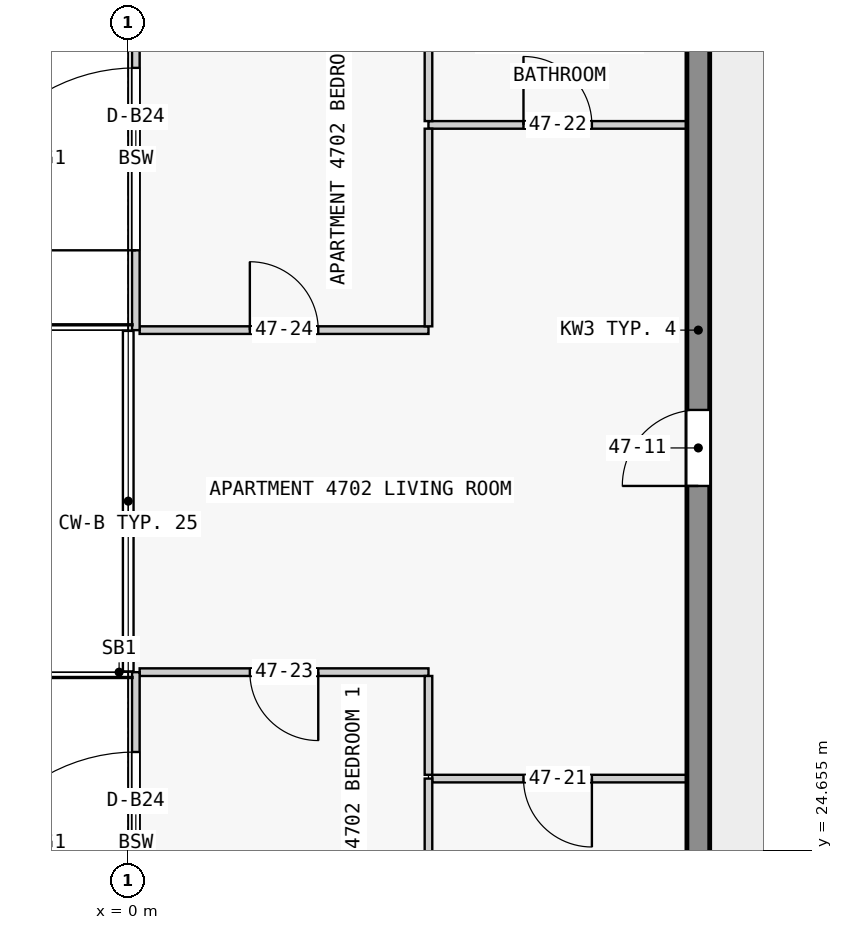
"""IFC4 building model, lengths in metres.
Left out: names, types, materials, properties, quantities, classifications, styles, units other than length and angle.
Written with IfcOpenShell. Run it as: python <this file> out.ifc"""

import sys

from ifc_helpers import new_model, si_unit, direction, frame, frame_2d, origin, place, context, subcontext, project, spatial, rectangle, extrude, element, fill, save


model = new_model("IFC4")
c1 = context("Model", 3, precision=1e-05, world=origin(), true_north=direction((0.0, 1.0)))
c2 = subcontext(c1, "Body", "Model", "MODEL_VIEW")
j1 = project(units=[si_unit("LENGTHUNIT", "METRE"), si_unit("PLANEANGLEUNIT", "RADIAN")], contexts=[c1])
p1 = place(None, origin())
s1 = spatial("IfcSite", under=j1, at=p1, CompositionType="ELEMENT")
p2 = place(p1, origin())
s2 = spatial("IfcBuilding", under=s1, at=p2, CompositionType="ELEMENT")
p3 = place(p2, frame((0.0, 0.0, 181.4)))
s3 = spatial("IfcBuildingStorey", under=s2, at=p3, CompositionType="ELEMENT", Elevation=181.4)
p4 = place(p3, frame((7.5, 18.0, 0.0), z_axis=(0.0, 0.0, 1.0), x_axis=(0.0, 1.0, 0.0)))
e1 = element("IfcWall", 1, at=p4, inside=s3, PredefinedType="SHEAR", context=c2, shape_type="SweptSolid", body=[
    extrude(rectangle(XDim=27.0, YDim=0.3, at=frame_2d((13.5, 0.0))), origin(), (0.0, 0.0, 1.0), 3.2),
])
p5 = place(p4, frame((1.75, 0.0, 0.0)))
e2 = element("IfcOpeningElement", 2, at=p5, cuts=e1, PredefinedType="OPENING", context=c2, shape_type="SweptSolid", body=[
    extrude(rectangle(XDim=1.0, YDim=2.1, at=frame_2d((0.5, 1.05))), frame((0.0, 0.16, 0.0), z_axis=(0.0, -1.0, 0.0), x_axis=(1.0, 0.0, 0.0)), (0.0, 0.0, 1.0), 0.32),
])
p6 = place(p4, frame((11.45, 0.0, 0.0)))
e3 = element("IfcOpeningElement", 3, at=p6, cuts=e1, PredefinedType="OPENING", context=c2, shape_type="SweptSolid", body=[
    extrude(rectangle(XDim=1.0, YDim=2.1, at=frame_2d((0.5, 1.05))), frame((0.0, 0.16, 0.0), z_axis=(0.0, -1.0, 0.0), x_axis=(1.0, 0.0, 0.0)), (0.0, 0.0, 1.0), 0.32),
])
p7 = place(p4, frame((19.75, 0.0, 0.0)))
e4 = element("IfcOpeningElement", 4, at=p7, cuts=e1, PredefinedType="OPENING", context=c2, shape_type="SweptSolid", body=[
    extrude(rectangle(XDim=1.0, YDim=2.1, at=frame_2d((0.5, 1.05))), frame((0.0, 0.16, 0.0), z_axis=(0.0, -1.0, 0.0), x_axis=(1.0, 0.0, 0.0)), (0.0, 0.0, 1.0), 0.32),
])
p8 = place(p4, frame((23.25, 0.0, 0.0)))
e5 = element("IfcOpeningElement", 5, at=p8, cuts=e1, PredefinedType="OPENING", context=c2, shape_type="SweptSolid", body=[
    extrude(rectangle(XDim=0.9, YDim=2.1, at=frame_2d((0.45, 1.05))), frame((0.0, 0.16, 0.0), z_axis=(0.0, -1.0, 0.0), x_axis=(1.0, 0.0, 0.0)), (0.0, 0.0, 1.0), 0.32),
])
p9 = place(p4, frame((25.45, 0.0, 0.0)))
e6 = element("IfcOpeningElement", 6, at=p9, cuts=e1, PredefinedType="OPENING", context=c2, shape_type="SweptSolid", body=[
    extrude(rectangle(XDim=1.0, YDim=2.1, at=frame_2d((0.5, 1.05))), frame((0.0, 0.16, 0.0), z_axis=(0.0, -1.0, 0.0), x_axis=(1.0, 0.0, 0.0)), (0.0, 0.0, 1.0), 0.32),
])
p10 = place(p3, frame((0.1, 22.5, 0.0), z_axis=(0.0, 0.0, 1.0), x_axis=(0.0, 1.0, 0.0)))
e7 = element("IfcWall", 7, at=p10, inside=s3, PredefinedType="STANDARD", context=c2, shape_type="SweptSolid", body=[
    extrude(rectangle(XDim=4.5, YDim=0.1, at=frame_2d((2.25, 0.0))), origin(), (0.0, 0.0, 1.0), 3.2),
])
p11 = place(p10, frame((1.05, 0.0, 0.0)))
e8 = element("IfcOpeningElement", 8, at=p11, cuts=e7, PredefinedType="OPENING", context=c2, shape_type="SweptSolid", body=[
    extrude(rectangle(XDim=2.4, YDim=2.4, at=frame_2d((1.2, 1.2))), frame((0.0, 0.06, 0.0), z_axis=(0.0, -1.0, 0.0), x_axis=(1.0, 0.0, 0.0)), (0.0, 0.0, 1.0), 0.12),
])
p12 = place(p3, frame((0.1, 31.5, 0.0), z_axis=(0.0, 0.0, 1.0), x_axis=(0.0, 1.0, 0.0)))
e9 = element("IfcWall", 9, at=p12, inside=s3, PredefinedType="STANDARD", context=c2, shape_type="SweptSolid", body=[
    extrude(rectangle(XDim=4.5, YDim=0.1, at=frame_2d((2.25, 0.0))), origin(), (0.0, 0.0, 1.0), 3.2),
])
p13 = place(p12, frame((1.05, 0.0, 0.0)))
e10 = element("IfcOpeningElement", 10, at=p13, cuts=e9, PredefinedType="OPENING", context=c2, shape_type="SweptSolid", body=[
    extrude(rectangle(XDim=2.4, YDim=2.4, at=frame_2d((1.2, 1.2))), frame((0.0, 0.06, 0.0), z_axis=(0.0, -1.0, 0.0), x_axis=(1.0, 0.0, 0.0)), (0.0, 0.0, 1.0), 0.12),
])
p14 = place(p3, frame((7.35, 25.6, 0.0), z_axis=(0.0, 0.0, 1.0), x_axis=(-1.0, 0.0, 0.0)))
e11 = element("IfcWall", 11, at=p14, inside=s3, PredefinedType="PARTITIONING", context=c2, shape_type="SweptSolid", body=[
    extrude(rectangle(XDim=3.35, YDim=0.1, at=frame_2d((1.675, 0.0))), origin(), (0.0, 0.0, 1.0), 3.2),
])
p15 = place(p14, frame((1.25, 0.0, 0.0)))
e12 = element("IfcOpeningElement", 12, at=p15, cuts=e11, PredefinedType="OPENING", context=c2, shape_type="SweptSolid", body=[
    extrude(rectangle(XDim=0.9, YDim=2.1, at=frame_2d((0.45, 1.05))), frame((0.0, 0.06, 0.0), z_axis=(0.0, -1.0, 0.0), x_axis=(1.0, 0.0, 0.0)), (0.0, 0.0, 1.0), 0.12),
])
p16 = place(p3, frame((3.95, 27.0, 0.0), z_axis=(0.0, 0.0, 1.0), x_axis=(-1.0, 0.0, 0.0)))
e13 = element("IfcWall", 13, at=p16, inside=s3, PredefinedType="PARTITIONING", context=c2, shape_type="SweptSolid", body=[
    extrude(rectangle(XDim=3.8, YDim=0.1, at=frame_2d((1.9, 0.0))), origin(), (0.0, 0.0, 1.0), 3.2),
])
p17 = place(p16, frame((1.45, 0.0, 0.0)))
e14 = element("IfcOpeningElement", 14, at=p17, cuts=e13, PredefinedType="OPENING", context=c2, shape_type="SweptSolid", body=[
    extrude(rectangle(XDim=0.9, YDim=2.1, at=frame_2d((0.45, 1.05))), frame((0.0, 0.06, 0.0), z_axis=(0.0, -1.0, 0.0), x_axis=(1.0, 0.0, 0.0)), (0.0, 0.0, 1.0), 0.12),
])
p18 = place(p3, frame((0.15, 31.5, 0.0), z_axis=(0.0, 0.0, 1.0), x_axis=(1.0, 0.0, 0.0)))
e15 = element("IfcWall", 15, at=p18, inside=s3, PredefinedType="PARTITIONING", context=c2, shape_type="SweptSolid", body=[
    extrude(rectangle(XDim=3.8, YDim=0.1, at=frame_2d((1.9, 0.0))), origin(), (0.0, 0.0, 1.0), 3.2),
])
p19 = place(p18, frame((1.45, 0.0, 0.0)))
e16 = element("IfcOpeningElement", 16, at=p19, cuts=e15, PredefinedType="OPENING", context=c2, shape_type="SweptSolid", body=[
    extrude(rectangle(XDim=0.9, YDim=2.1, at=frame_2d((0.45, 1.05))), frame((0.0, 0.06, 0.0), z_axis=(0.0, -1.0, 0.0), x_axis=(1.0, 0.0, 0.0)), (0.0, 0.0, 1.0), 0.12),
])
p20 = place(p3, frame((3.95, 34.2, 0.0), z_axis=(0.0, 0.0, 1.0), x_axis=(1.0, 0.0, 0.0)))
e17 = element("IfcWall", 17, at=p20, inside=s3, PredefinedType="PARTITIONING", context=c2, shape_type="SweptSolid", body=[
    extrude(rectangle(XDim=3.4, YDim=0.1, at=frame_2d((1.7, 0.0))), origin(), (0.0, 0.0, 1.0), 3.2),
])
p21 = place(p20, frame((1.25, 0.0, 0.0)))
e18 = element("IfcOpeningElement", 18, at=p21, cuts=e17, PredefinedType="OPENING", context=c2, shape_type="SweptSolid", body=[
    extrude(rectangle(XDim=0.9, YDim=2.1, at=frame_2d((0.45, 1.05))), frame((0.0, 0.06, 0.0), z_axis=(0.0, -1.0, 0.0), x_axis=(1.0, 0.0, 0.0)), (0.0, 0.0, 1.0), 0.12),
])
p22 = place(p3, frame((3.95, 25.6, 0.0), z_axis=(0.0, 0.0, 1.0), x_axis=(0.0, -1.0, 0.0)))
e19 = element("IfcWall", 19, at=p22, inside=s3, PredefinedType="PARTITIONING", context=c2, shape_type="SweptSolid", body=[
    extrude(rectangle(XDim=3.0, YDim=0.1, at=frame_2d((1.5, 0.0))), origin(), (0.0, 0.0, 1.0), 3.2),
])
p23 = place(p3, frame((3.95, 35.9, 0.0), z_axis=(0.0, 0.0, 1.0), x_axis=(0.0, -1.0, 0.0)))
e20 = element("IfcWall", 20, at=p23, inside=s3, PredefinedType="PARTITIONING", context=c2, shape_type="SweptSolid", body=[
    extrude(rectangle(XDim=1.65, YDim=0.1, at=frame_2d((0.825, 0.0))), origin(), (0.0, 0.0, 1.0), 3.2),
])
p24 = place(p3, frame((3.95, 25.65, 0.0), z_axis=(0.0, 0.0, 1.0), x_axis=(0.0, 1.0, 0.0)))
e21 = element("IfcWall", 21, at=p24, inside=s3, PredefinedType="PARTITIONING", context=c2, shape_type="SweptSolid", body=[
    extrude(rectangle(XDim=1.3, YDim=0.1, at=frame_2d((0.65, 0.0))), origin(), (0.0, 0.0, 1.0), 3.2),
])
p25 = place(p3, frame((3.95, 31.55, 0.0), z_axis=(0.0, 0.0, 1.0), x_axis=(0.0, 1.0, 0.0)))
e22 = element("IfcWall", 22, at=p25, inside=s3, PredefinedType="PARTITIONING", context=c2, shape_type="SweptSolid", body=[
    extrude(rectangle(XDim=2.6, YDim=0.1, at=frame_2d((1.3, 0.0))), origin(), (0.0, 0.0, 1.0), 3.2),
])
p26 = place(p11, origin())
e23 = element("IfcDoor", 23, at=p26, inside=s3, OperationType="SINGLE_SWING_LEFT", PredefinedType="DOOR", context=c2, shape_type="SweptSolid", body=[
    extrude(rectangle(XDim=2.4, YDim=2.4, at=frame_2d((1.2, 1.2))), frame((0.0, 0.025, 0.0), z_axis=(0.0, -1.0, 0.0), x_axis=(1.0, 0.0, 0.0)), (0.0, 0.0, 1.0), 0.05),
])
fill(e8, e23)
p27 = place(p13, origin())
e24 = element("IfcDoor", 24, at=p27, inside=s3, OperationType="SINGLE_SWING_LEFT", PredefinedType="DOOR", context=c2, shape_type="SweptSolid", body=[
    extrude(rectangle(XDim=2.4, YDim=2.4, at=frame_2d((1.2, 1.2))), frame((0.0, 0.025, 0.0), z_axis=(0.0, -1.0, 0.0), x_axis=(1.0, 0.0, 0.0)), (0.0, 0.0, 1.0), 0.05),
])
fill(e10, e24)
p28 = place(p6, origin())
e25 = element("IfcDoor", 25, at=p28, inside=s3, OperationType="SINGLE_SWING_LEFT", PredefinedType="DOOR", context=c2, shape_type="SweptSolid", body=[
    extrude(rectangle(XDim=1.0, YDim=2.1, at=frame_2d((0.5, 1.05))), frame((0.0, 0.025, 0.0), z_axis=(0.0, -1.0, 0.0), x_axis=(1.0, 0.0, 0.0)), (0.0, 0.0, 1.0), 0.05),
])
fill(e3, e25)
p29 = place(p15, origin())
e26 = element("IfcDoor", 26, at=p29, inside=s3, OperationType="SINGLE_SWING_RIGHT", PredefinedType="DOOR", context=c2, shape_type="SweptSolid", body=[
    extrude(rectangle(XDim=0.9, YDim=2.1, at=frame_2d((0.45, 1.05))), frame((0.0, 0.025, 0.0), z_axis=(0.0, -1.0, 0.0), x_axis=(1.0, 0.0, 0.0)), (0.0, 0.0, 1.0), 0.05),
])
fill(e12, e26)
p30 = place(p21, origin())
e27 = element("IfcDoor", 27, at=p30, inside=s3, OperationType="SINGLE_SWING_RIGHT", PredefinedType="DOOR", context=c2, shape_type="SweptSolid", body=[
    extrude(rectangle(XDim=0.9, YDim=2.1, at=frame_2d((0.45, 1.05))), frame((0.0, 0.025, 0.0), z_axis=(0.0, -1.0, 0.0), x_axis=(1.0, 0.0, 0.0)), (0.0, 0.0, 1.0), 0.05),
])
fill(e18, e27)
p31 = place(p17, origin())
e28 = element("IfcDoor", 28, at=p31, inside=s3, OperationType="SINGLE_SWING_LEFT", PredefinedType="DOOR", context=c2, shape_type="SweptSolid", body=[
    extrude(rectangle(XDim=0.9, YDim=2.1, at=frame_2d((0.45, 1.05))), frame((0.0, 0.025, 0.0), z_axis=(0.0, -1.0, 0.0), x_axis=(1.0, 0.0, 0.0)), (0.0, 0.0, 1.0), 0.05),
])
fill(e14, e28)
p32 = place(p19, origin())
e29 = element("IfcDoor", 29, at=p32, inside=s3, OperationType="SINGLE_SWING_LEFT", PredefinedType="DOOR", context=c2, shape_type="SweptSolid", body=[
    extrude(rectangle(XDim=0.9, YDim=2.1, at=frame_2d((0.45, 1.05))), frame((0.0, 0.025, 0.0), z_axis=(0.0, -1.0, 0.0), x_axis=(1.0, 0.0, 0.0)), (0.0, 0.0, 1.0), 0.05),
])
fill(e16, e29)
save(model, sys.argv[1])
